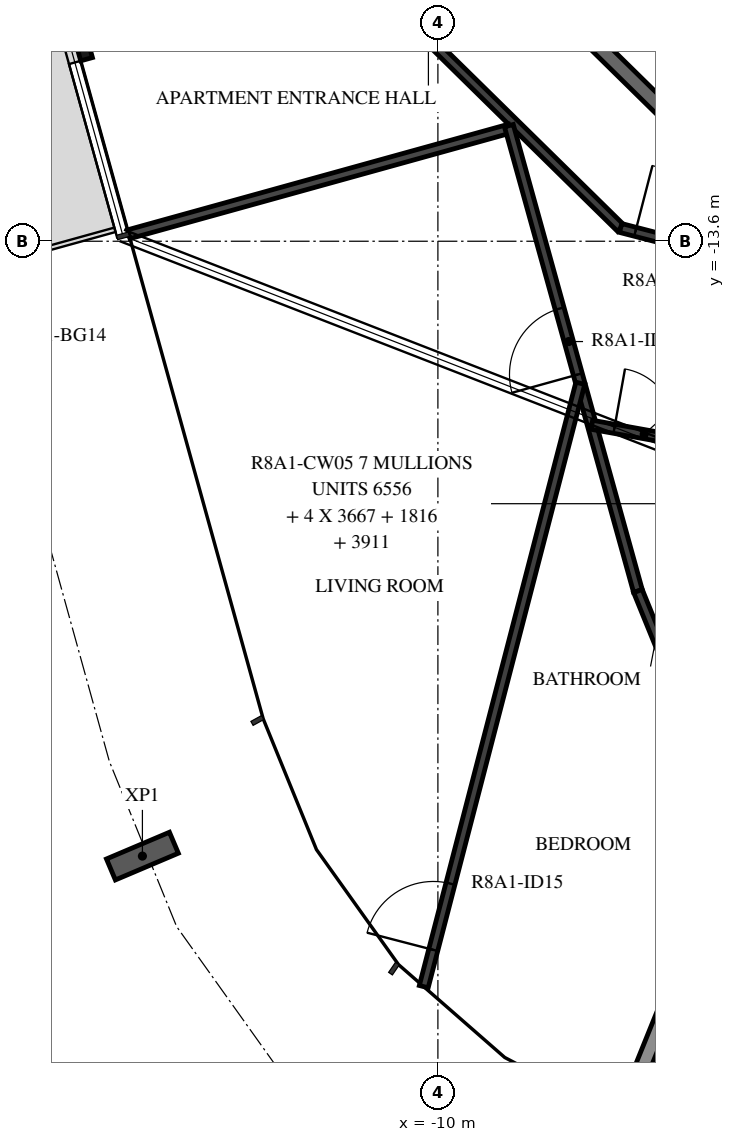
"""IFC4 building model, lengths in metres.
Left out: names, types, materials, properties, quantities, classifications, styles, units other than length and angle.
Written with IfcOpenShell. Run it as: python <this file> out.ifc"""

import sys

from ifc_helpers import new_model, si_unit, direction, frame, frame_2d, origin, origin_2d, place, context, subcontext, project, spatial, rectangle, i_section, extrude, element, fill, save


model = new_model("IFC4")
c1 = context("Model", 3, precision=1e-05, world=origin(), true_north=direction((0.0, 1.0)))
c2 = subcontext(c1, "Body", "Model", "MODEL_VIEW")
j1 = project(units=[si_unit("LENGTHUNIT", "METRE"), si_unit("PLANEANGLEUNIT", "RADIAN")], contexts=[c1])
p1 = place(None, origin())
s1 = spatial("IfcSite", under=j1, at=p1, CompositionType="ELEMENT")
p2 = place(p1, origin())
s2 = spatial("IfcBuilding", under=s1, at=p2, CompositionType="ELEMENT")
p3 = place(p2, frame((0.0, 0.0, 301.7)))
s3 = spatial("IfcBuildingStorey", under=s2, at=p3, CompositionType="ELEMENT", Elevation=301.7)
p4 = place(p3, frame((-13.887, -21.689, -0.38), z_axis=(0.0, 0.0, 1.0), x_axis=(-0.390457907184, 0.920620781167, 0.0)))
e1 = element("IfcColumn", 1, at=p4, inside=s3, PredefinedType="COLUMN", context=c2, shape_type="SweptSolid", body=[
    extrude(i_section(OverallWidth=0.3, OverallDepth=0.9, WebThickness=0.019, FlangeThickness=0.035, FilletRadius=0.03, at=origin_2d()), origin(), (0.0, 0.0, 1.0), 3.5),
])
p5 = place(p3, frame((-15.477, -8.122, 0.0), z_axis=(0.0, 0.0, 1.0), x_axis=(0.267195229387, -0.963642417805, 0.0)))
e2 = element("IfcWall", 2, at=p5, inside=s3, PredefinedType="STANDARD", context=c2, shape_type="SweptSolid", body=[
    extrude(rectangle(XDim=3.2, YDim=0.16, at=frame_2d((1.6, 0.0))), origin(), (0.0, 0.0, 1.0), 3.12),
])
p6 = place(p5, frame((0.4, 0.0, 0.0)))
e3 = element("IfcOpeningElement", 3, at=p6, cuts=e2, PredefinedType="OPENING", context=c2, shape_type="SweptSolid", body=[
    extrude(rectangle(XDim=2.4, YDim=2.4, at=frame_2d((1.2, 1.2))), frame((0.0, 0.09, 0.0), z_axis=(0.0, -1.0, 0.0), x_axis=(1.0, 0.0, 0.0)), (0.0, 0.0, 1.0), 0.18),
])
p7 = place(p3, frame((-11.953, -7.041, 0.0), z_axis=(0.0, 0.0, 1.0), x_axis=(0.713250549143, -0.70090916255, 0.0)))
e4 = element("IfcWall", 4, at=p7, inside=s3, PredefinedType="STANDARD", context=c2, shape_type="SweptSolid", body=[
    extrude(rectangle(XDim=7.181, YDim=0.2, at=frame_2d((3.59, 0.0))), origin(), (0.0, 0.0, 1.0), 3.12),
])
p8 = place(p3, frame((-7.582, -25.151, 0.0), z_axis=(0.0, 0.0, 1.0), x_axis=(0.374645287615, 0.927168220156, 0.0)))
e5 = element("IfcWall", 5, at=p8, inside=s3, PredefinedType="STANDARD", context=c2, shape_type="SweptSolid", body=[
    extrude(rectangle(XDim=6.423, YDim=0.2, at=frame_2d((3.212, 0.0))), origin(), (0.0, 0.0, 1.0), 2.73),
])
p9 = place(p3, frame((-10.59, -10.483, 0.0), z_axis=(0.0, 0.0, 1.0), x_axis=(0.713244109461, -0.70091571556, 0.0)))
e6 = element("IfcWall", 6, at=p9, inside=s3, PredefinedType="PARTITIONING", context=c2, shape_type="SweptSolid", body=[
    extrude(rectangle(XDim=4.198, YDim=0.12, at=frame_2d((2.099, 0.0))), origin(), (0.0, 0.0, 1.0), 3.12),
])
p10 = place(p3, frame((-7.596, -13.426, 0.0), z_axis=(0.0, 0.0, 1.0), x_axis=(0.96815406745, -0.250355151095, 0.0)))
e7 = element("IfcWall", 7, at=p10, inside=s3, PredefinedType="PARTITIONING", context=c2, shape_type="SweptSolid", body=[
    extrude(rectangle(XDim=3.992, YDim=0.12, at=frame_2d((1.996, 0.0))), origin(), (0.0, 0.0, 1.0), 3.12),
])
p11 = place(p10, frame((0.2, 0.0, 0.0)))
e8 = element("IfcOpeningElement", 8, at=p11, cuts=e7, PredefinedType="OPENING", context=c2, shape_type="SweptSolid", body=[
    extrude(rectangle(XDim=0.9, YDim=2.1, at=frame_2d((0.45, 1.05))), frame((0.0, 0.07, 0.0), z_axis=(0.0, -1.0, 0.0), x_axis=(1.0, 0.0, 0.0)), (0.0, 0.0, 1.0), 0.14),
])
p12 = place(p3, frame((-14.066, -13.508, 0.0), z_axis=(0.0, 0.0, 1.0), x_axis=(0.963643585504, 0.267191018032, 0.0)))
e9 = element("IfcWall", 9, at=p12, inside=s3, PredefinedType="PARTITIONING", context=c2, shape_type="SweptSolid", body=[
    extrude(rectangle(XDim=5.2, YDim=0.12, at=frame_2d((2.6, 0.0))), origin(), (0.0, 0.0, 1.0), 2.73),
])
p13 = place(p3, frame((-7.368, -18.202, 0.0), z_axis=(0.0, 0.0, 1.0), x_axis=(-0.26723158658, 0.963632336077, 0.0)))
e10 = element("IfcWall", 10, at=p13, inside=s3, PredefinedType="PARTITIONING", context=c2, shape_type="SweptSolid", body=[
    extrude(rectangle(XDim=6.353, YDim=0.12, at=frame_2d((3.177, 0.0))), origin(), (0.0, 0.0, 1.0), 3.12),
])
p14 = place(p13, frame((2.956, 0.0, 0.0)))
e11 = element("IfcOpeningElement", 11, at=p14, cuts=e10, PredefinedType="OPENING", context=c2, shape_type="SweptSolid", body=[
    extrude(rectangle(XDim=0.9, YDim=2.1, at=frame_2d((0.45, 1.05))), frame((0.0, 0.07, 0.0), z_axis=(0.0, -1.0, 0.0), x_axis=(1.0, 0.0, 0.0)), (0.0, 0.0, 1.0), 0.14),
])
p15 = place(p3, frame((-10.186, -23.406, 0.0), z_axis=(0.0, 0.0, 1.0), x_axis=(0.251184292323, 0.967939280787, 0.0)))
e12 = element("IfcWall", 12, at=p15, inside=s3, PredefinedType="PARTITIONING", context=c2, shape_type="SweptSolid", body=[
    extrude(rectangle(XDim=8.2, YDim=0.12, at=frame_2d((4.1, 0.0))), origin(), (0.0, 0.0, 1.0), 3.12),
])
p16 = place(p15, frame((0.5, 0.0, 0.0)))
e13 = element("IfcOpeningElement", 13, at=p16, cuts=e12, PredefinedType="OPENING", context=c2, shape_type="SweptSolid", body=[
    extrude(rectangle(XDim=0.9, YDim=2.1, at=frame_2d((0.45, 1.05))), frame((0.0, 0.07, 0.0), z_axis=(0.0, -1.0, 0.0), x_axis=(1.0, 0.0, 0.0)), (0.0, 0.0, 1.0), 0.14),
])
p17 = place(p3, frame((-7.975, -16.015, 0.0), z_axis=(0.0, 0.0, 1.0), x_axis=(0.984356897167, -0.176185978441, 0.0)))
e14 = element("IfcWall", 14, at=p17, inside=s3, PredefinedType="PARTITIONING", context=c2, shape_type="SweptSolid", body=[
    extrude(rectangle(XDim=1.966, YDim=0.12, at=frame_2d((0.983, 0.0))), origin(), (0.0, 0.0, 1.0), 3.12),
])
p18 = place(p17, frame((0.3, 0.0, 0.0)))
e15 = element("IfcOpeningElement", 15, at=p18, cuts=e14, PredefinedType="OPENING", context=c2, shape_type="SweptSolid", body=[
    extrude(rectangle(XDim=0.8, YDim=2.1, at=frame_2d((0.4, 1.05))), frame((0.0, 0.07, 0.0), z_axis=(0.0, -1.0, 0.0), x_axis=(1.0, 0.0, 0.0)), (0.0, 0.0, 1.0), 0.14),
])
p19 = place(p3, frame((-7.011, -19.079, 0.0), z_axis=(0.0, 0.0, 1.0), x_axis=(-0.377296887314, 0.92609235977, 0.0)))
e16 = element("IfcWall", 16, at=p19, inside=s3, PredefinedType="PARTITIONING", context=c2, shape_type="SweptSolid", body=[
    extrude(rectangle(XDim=0.947, YDim=0.12, at=frame_2d((0.473, 0.0))), origin(), (0.0, 0.0, 1.0), 3.12),
])
p20 = place(p11, origin())
e17 = element("IfcDoor", 17, at=p20, inside=s3, OperationType="SINGLE_SWING_RIGHT", PredefinedType="DOOR", context=c2, shape_type="SweptSolid", body=[
    extrude(rectangle(XDim=0.9, YDim=2.1, at=frame_2d((0.45, 1.05))), frame((0.0, 0.025, 0.0), z_axis=(0.0, -1.0, 0.0), x_axis=(1.0, 0.0, 0.0)), (0.0, 0.0, 1.0), 0.05),
])
fill(e8, e17)
p21 = place(p14, origin())
e18 = element("IfcDoor", 18, at=p21, inside=s3, OperationType="SINGLE_SWING_RIGHT", PredefinedType="DOOR", context=c2, shape_type="SweptSolid", body=[
    extrude(rectangle(XDim=0.9, YDim=2.1, at=frame_2d((0.45, 1.05))), frame((0.0, 0.025, 0.0), z_axis=(0.0, -1.0, 0.0), x_axis=(1.0, 0.0, 0.0)), (0.0, 0.0, 1.0), 0.05),
])
fill(e11, e18)
p22 = place(p16, origin())
e19 = element("IfcDoor", 19, at=p22, inside=s3, OperationType="SINGLE_SWING_RIGHT", PredefinedType="DOOR", context=c2, shape_type="SweptSolid", body=[
    extrude(rectangle(XDim=0.9, YDim=2.1, at=frame_2d((0.45, 1.05))), frame((0.0, 0.025, 0.0), z_axis=(0.0, -1.0, 0.0), x_axis=(1.0, 0.0, 0.0)), (0.0, 0.0, 1.0), 0.05),
])
fill(e13, e19)
p23 = place(p18, origin())
e20 = element("IfcDoor", 20, at=p23, inside=s3, OperationType="SINGLE_SWING_RIGHT", PredefinedType="DOOR", context=c2, shape_type="SweptSolid", body=[
    extrude(rectangle(XDim=0.8, YDim=2.1, at=frame_2d((0.4, 1.05))), frame((0.0, 0.025, 0.0), z_axis=(0.0, -1.0, 0.0), x_axis=(1.0, 0.0, 0.0)), (0.0, 0.0, 1.0), 0.05),
])
fill(e15, e20)
save(model, sys.argv[1])
